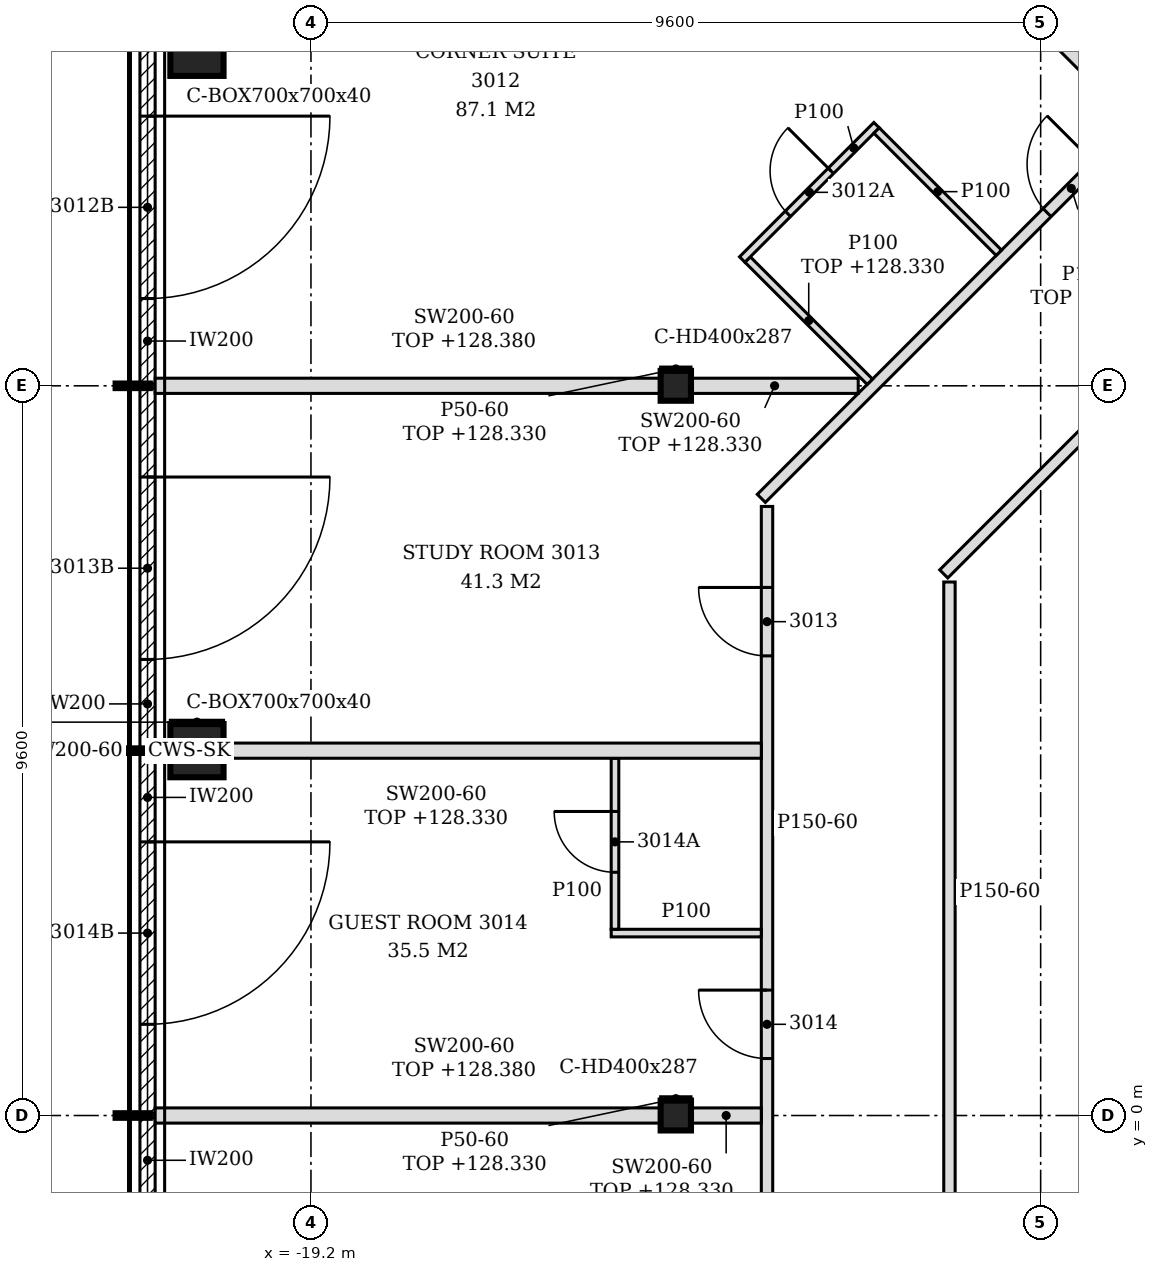
"""IFC4 building model, lengths in metres.
Left out: names, types, materials, properties, quantities, classifications, styles, units other than length and angle.
Written with IfcOpenShell. Run it as: python <this file> out.ifc"""

import sys

from ifc_helpers import new_model, si_unit, direction, frame, frame_2d, origin, origin_2d, place, context, subcontext, project, spatial, polyline, rectangle, hollow_rectangle, i_section, outline, extrude, element, fill, save


model = new_model("IFC4")
c1 = context("Model", 3, precision=1e-05, world=origin(), true_north=direction((0.0, 1.0)))
c2 = subcontext(c1, "Body", "Model", "MODEL_VIEW")
j1 = project(units=[si_unit("LENGTHUNIT", "METRE"), si_unit("PLANEANGLEUNIT", "RADIAN")], contexts=[c1])
p1 = place(None, origin())
s1 = spatial("IfcSite", under=j1, at=p1, CompositionType="ELEMENT")
p2 = place(p1, origin())
s2 = spatial("IfcBuilding", under=s1, at=p2, CompositionType="ELEMENT")
p3 = place(p2, frame((0.0, 0.0, 125.4)))
s3 = spatial("IfcBuildingStorey", under=s2, at=p3, CompositionType="ELEMENT", Elevation=125.4)
for number, where, z_axis, x_axis in (
    (1, (-20.7, 14.027, -0.15), (0.0, 0.0, 1.0), (1.0, 0.0, 0.0)),
    (2, (-20.7, 4.8, -0.15), (0.0, 0.0, 1.0), (1.0, 0.0, 0.0)),
):
    element("IfcColumn", number, at=place(p3, frame(where, z_axis=z_axis, x_axis=x_axis)), inside=s3, PredefinedType="COLUMN", context=c2, shape_type="SweptSolid", body=[
        extrude(hollow_rectangle(XDim=0.7, YDim=0.7, WallThickness=0.04, at=origin_2d()), origin(), (0.0, 0.0, 1.0), 3.6),
    ])
for number, where, z_axis, x_axis in (
    (3, (-14.4, 0.0, -0.15), (0.0, 0.0, 1.0), (1.0, 0.0, 0.0)),
    (4, (-14.4, 9.6, -0.15), (0.0, 0.0, 1.0), (1.0, 0.0, 0.0)),
):
    element("IfcColumn", number, at=place(p3, frame(where, z_axis=z_axis, x_axis=x_axis)), inside=s3, PredefinedType="COLUMN", context=c2, shape_type="SweptSolid", body=[
        extrude(i_section(OverallWidth=0.399, OverallDepth=0.393, WebThickness=0.023, FlangeThickness=0.037, FilletRadius=0.015, at=origin_2d()), origin(), (0.0, 0.0, 1.0), 3.6),
    ])
p4 = place(p3, frame((-21.35, 14.256, 0.0), z_axis=(0.0, 0.0, 1.0), x_axis=(0.0, -1.0, 0.0)))
e5 = element("IfcWall", 5, at=p4, inside=s3, PredefinedType="NOTDEFINED", context=c2, shape_type="SweptSolid", body=[
    extrude(rectangle(XDim=4.626, YDim=0.2, at=frame_2d((2.313, 0.0))), origin(), (0.0, 0.0, 1.0), 3.45),
])
p5 = place(p4, frame((1.108, 0.0, 0.0)))
e6 = element("IfcOpeningElement", 6, at=p5, cuts=e5, PredefinedType="OPENING", context=c2, shape_type="SweptSolid", body=[
    extrude(rectangle(XDim=2.4, YDim=2.4, at=frame_2d((1.2, 1.2))), frame((0.0, 0.11, 0.0), z_axis=(0.0, -1.0, 0.0), x_axis=(1.0, 0.0, 0.0)), (0.0, 0.0, 1.0), 0.22),
])
p6 = place(p3, frame((-21.35, 9.57, 0.0), z_axis=(0.0, 0.0, 1.0), x_axis=(0.0, -1.0, 0.0)))
e7 = element("IfcWall", 7, at=p6, inside=s3, PredefinedType="NOTDEFINED", context=c2, shape_type="SweptSolid", body=[
    extrude(rectangle(XDim=4.74, YDim=0.2, at=frame_2d((2.37, 0.0))), origin(), (0.0, 0.0, 1.0), 3.45),
])
p7 = place(p6, frame((1.17, 0.0, 0.0)))
e8 = element("IfcOpeningElement", 8, at=p7, cuts=e7, PredefinedType="OPENING", context=c2, shape_type="SweptSolid", body=[
    extrude(rectangle(XDim=2.4, YDim=2.4, at=frame_2d((1.2, 1.2))), frame((0.0, 0.11, 0.0), z_axis=(0.0, -1.0, 0.0), x_axis=(1.0, 0.0, 0.0)), (0.0, 0.0, 1.0), 0.22),
])
p8 = place(p3, frame((-21.35, 4.77, 0.0), z_axis=(0.0, 0.0, 1.0), x_axis=(0.0, -1.0, 0.0)))
e9 = element("IfcWall", 9, at=p8, inside=s3, PredefinedType="NOTDEFINED", context=c2, shape_type="SweptSolid", body=[
    extrude(rectangle(XDim=4.74, YDim=0.2, at=frame_2d((2.37, 0.0))), origin(), (0.0, 0.0, 1.0), 3.45),
])
p9 = place(p8, frame((1.17, 0.0, 0.0)))
e10 = element("IfcOpeningElement", 10, at=p9, cuts=e9, PredefinedType="OPENING", context=c2, shape_type="SweptSolid", body=[
    extrude(rectangle(XDim=2.4, YDim=2.4, at=frame_2d((1.2, 1.2))), frame((0.0, 0.11, 0.0), z_axis=(0.0, -1.0, 0.0), x_axis=(1.0, 0.0, 0.0)), (0.0, 0.0, 1.0), 0.22),
])
p10 = place(p3, frame((-21.35, -0.03, 0.0), z_axis=(0.0, 0.0, 1.0), x_axis=(0.0, -1.0, 0.0)))
e11 = element("IfcWall", 11, at=p10, inside=s3, PredefinedType="NOTDEFINED", context=c2, shape_type="SweptSolid", body=[
    extrude(rectangle(XDim=4.626, YDim=0.2, at=frame_2d((2.313, 0.0))), origin(), (0.0, 0.0, 1.0), 3.45),
])
p11 = place(p10, frame((1.118, 0.0, 0.0)))
e12 = element("IfcOpeningElement", 12, at=p11, cuts=e11, PredefinedType="OPENING", context=c2, shape_type="SweptSolid", body=[
    extrude(rectangle(XDim=2.4, YDim=2.4, at=frame_2d((1.2, 1.2))), frame((0.0, 0.11, 0.0), z_axis=(0.0, -1.0, 0.0), x_axis=(1.0, 0.0, 0.0)), (0.0, 0.0, 1.0), 0.22),
])
p12 = place(p3, frame((-13.2, -3.5, 0.0), z_axis=(0.0, 0.0, 1.0), x_axis=(0.0, 1.0, 0.0)))
e13 = element("IfcWall", 13, at=p12, inside=s3, PredefinedType="PARTITIONING", context=c2, shape_type="SweptSolid", body=[
    extrude(outline(polyline([(0.0, 0.0), (11.513, 0.0), (11.513, 3.45), (8.4, 3.45), (8.398, 2.93), (8.2, 2.93), (8.198, 3.45), (3.6, 3.45), (3.598, 2.93), (3.4, 2.93), (3.398, 3.45), (0.0, 3.45), (0.0, 0.0)])), frame((0.0, 0.075, 0.0), z_axis=(0.0, -1.0, 0.0), x_axis=(1.0, 0.0, 0.0)), (0.0, 0.0, 1.0), 0.15),
])
p13 = place(p12, frame((9.547, 0.0, 0.0)))
e14 = element("IfcOpeningElement", 14, at=p13, cuts=e13, PredefinedType="OPENING", context=c2, shape_type="SweptSolid", body=[
    extrude(rectangle(XDim=0.9, YDim=2.1, at=frame_2d((0.45, 1.05))), frame((0.0, 0.085, 0.0), z_axis=(0.0, -1.0, 0.0), x_axis=(1.0, 0.0, 0.0)), (0.0, 0.0, 1.0), 0.17),
])
p14 = place(p12, frame((4.25, 0.0, 0.0)))
e15 = element("IfcOpeningElement", 15, at=p14, cuts=e13, PredefinedType="OPENING", context=c2, shape_type="SweptSolid", body=[
    extrude(rectangle(XDim=0.9, YDim=2.1, at=frame_2d((0.45, 1.05))), frame((0.0, 0.085, 0.0), z_axis=(0.0, -1.0, 0.0), x_axis=(1.0, 0.0, 0.0)), (0.0, 0.0, 1.0), 0.17),
])
p15 = place(p12, frame((1.353, 0.0, 0.0)))
e16 = element("IfcOpeningElement", 16, at=p15, cuts=e13, PredefinedType="OPENING", context=c2, shape_type="SweptSolid", body=[
    extrude(rectangle(XDim=0.9, YDim=2.1, at=frame_2d((0.45, 1.05))), frame((0.0, 0.085, 0.0), z_axis=(0.0, -1.0, 0.0), x_axis=(1.0, 0.0, 0.0)), (0.0, 0.0, 1.0), 0.17),
])
p16 = place(p3, frame((-10.8, -1.125, 0.0), z_axis=(0.0, 0.0, 1.0), x_axis=(0.0, 1.0, 0.0)))
e17 = element("IfcWall", 17, at=p16, inside=s3, PredefinedType="PARTITIONING", context=c2, shape_type="SweptSolid", body=[
    extrude(outline(polyline([(0.0, 0.0), (8.144, 0.0), (8.144, 3.45), (6.025, 3.45), (6.023, 2.93), (5.825, 2.93), (5.823, 3.45), (1.225, 3.45), (1.223, 2.93), (1.025, 2.93), (1.023, 3.45), (0.0, 3.45), (0.0, 0.0)])), frame((0.0, 0.075, 0.0), z_axis=(0.0, -1.0, 0.0), x_axis=(1.0, 0.0, 0.0)), (0.0, 0.0, 1.0), 0.15),
])
p17 = place(p3, frame((-21.25, 0.0, 0.0), z_axis=(0.0, 0.0, 1.0), x_axis=(1.0, 0.0, 0.0)))
e18 = element("IfcWall", 18, at=p17, inside=s3, PredefinedType="PARTITIONING", context=c2, shape_type="SweptSolid", body=[
    extrude(outline(polyline([(0.0, 0.0), (6.65, 0.0), (6.65, 2.98), (0.7, 2.98), (0.698, 2.93), (0.4, 2.93), (0.398, 2.98), (0.0, 2.98), (0.0, 0.0)])), frame((0.0, 0.1, 0.0), z_axis=(0.0, -1.0, 0.0), x_axis=(1.0, 0.0, 0.0)), (0.0, 0.0, 1.0), 0.2),
])
p18 = place(p3, frame((-14.2, 0.0, 0.0), z_axis=(0.0, 0.0, 1.0), x_axis=(1.0, 0.0, 0.0)))
e19 = element("IfcWall", 19, at=p18, inside=s3, PredefinedType="PARTITIONING", context=c2, shape_type="SweptSolid", body=[
    extrude(rectangle(XDim=0.926, YDim=0.2, at=frame_2d((0.463, 0.0))), origin(), (0.0, 0.0, 1.0), 2.93),
])
p19 = place(p3, frame((-15.25, 2.4, 0.0), z_axis=(0.0, 0.0, 1.0), x_axis=(1.0, 0.0, 0.0)))
e20 = element("IfcWall", 20, at=p19, inside=s3, PredefinedType="PARTITIONING", context=c2, shape_type="SweptSolid", body=[
    extrude(outline(polyline([(0.0, 0.0), (1.975, 0.0), (1.975, 3.45), (1.0, 3.45), (0.998, 2.93), (0.7, 2.93), (0.698, 3.45), (0.0, 3.45), (0.0, 0.0)])), frame((0.0, 0.05, 0.0), z_axis=(0.0, -1.0, 0.0), x_axis=(1.0, 0.0, 0.0)), (0.0, 0.0, 1.0), 0.1),
])
p20 = place(p3, frame((-15.2, 2.45, 0.0), z_axis=(0.0, 0.0, 1.0), x_axis=(0.0, 1.0, 0.0)))
e21 = element("IfcWall", 21, at=p20, inside=s3, PredefinedType="PARTITIONING", context=c2, shape_type="SweptSolid", body=[
    extrude(rectangle(XDim=2.25, YDim=0.1, at=frame_2d((1.125, 0.0))), origin(), (0.0, 0.0, 1.0), 3.45),
])
p21 = place(p20, frame((0.75, 0.0, 0.0)))
e22 = element("IfcOpeningElement", 22, at=p21, cuts=e21, PredefinedType="OPENING", context=c2, shape_type="SweptSolid", body=[
    extrude(rectangle(XDim=0.8, YDim=2.1, at=frame_2d((0.4, 1.05))), frame((0.0, 0.06, 0.0), z_axis=(0.0, -1.0, 0.0), x_axis=(1.0, 0.0, 0.0)), (0.0, 0.0, 1.0), 0.12),
])
p22 = place(p3, frame((-21.25, 4.8, 0.0), z_axis=(0.0, 0.0, 1.0), x_axis=(1.0, 0.0, 0.0)))
e23 = element("IfcWall", 23, at=p22, inside=s3, PredefinedType="PARTITIONING", context=c2, shape_type="SweptSolid", body=[
    extrude(rectangle(XDim=0.2, YDim=0.2, at=frame_2d((0.1, 0.0))), origin(), (0.0, 0.0, 1.0), 3.45),
])
p23 = place(p3, frame((-20.35, 4.8, 0.0), z_axis=(0.0, 0.0, 1.0), x_axis=(1.0, 0.0, 0.0)))
e24 = element("IfcWall", 24, at=p23, inside=s3, PredefinedType="PARTITIONING", context=c2, shape_type="SweptSolid", body=[
    extrude(rectangle(XDim=7.075, YDim=0.2, at=frame_2d((3.538, 0.0))), origin(), (0.0, 0.0, 1.0), 2.93),
])
p24 = place(p3, frame((-10.875, 7.125, 0.0), z_axis=(0.0, 0.0, 1.0), x_axis=(0.707106781187, 0.707106781187, 0.0)))
e25 = element("IfcWall", 25, at=p24, inside=s3, PredefinedType="PARTITIONING", context=c2, shape_type="SweptSolid", body=[
    extrude(rectangle(XDim=8.296, YDim=0.15, at=frame_2d((4.148, 0.0))), origin(), (0.0, 0.0, 1.0), 2.93),
])
p25 = place(p3, frame((-13.275, 8.119, 0.0), z_axis=(0.0, 0.0, 1.0), x_axis=(0.707099678619, 0.707113883683, 0.0)))
e26 = element("IfcWall", 26, at=p25, inside=s3, PredefinedType="PARTITIONING", context=c2, shape_type="SweptSolid", body=[
    extrude(rectangle(XDim=17.187, YDim=0.15, at=frame_2d((8.593, 0.0))), origin(), (0.0, 0.0, 1.0), 2.73),
])
p26 = place(p25, frame((9.073, 0.0, 0.0)))
e27 = element("IfcOpeningElement", 27, at=p26, cuts=e26, PredefinedType="OPENING", context=c2, shape_type="SweptSolid", body=[
    extrude(rectangle(XDim=0.9, YDim=2.1, at=frame_2d((0.45, 1.05))), frame((0.0, 0.085, 0.0), z_axis=(0.0, -1.0, 0.0), x_axis=(1.0, 0.0, 0.0)), (0.0, 0.0, 1.0), 0.17),
])
p27 = place(p25, frame((5.317, 0.0, 0.0)))
e28 = element("IfcOpeningElement", 28, at=p27, cuts=e26, PredefinedType="OPENING", context=c2, shape_type="SweptSolid", body=[
    extrude(rectangle(XDim=0.9, YDim=2.1, at=frame_2d((0.45, 1.05))), frame((0.0, 0.085, 0.0), z_axis=(0.0, -1.0, 0.0), x_axis=(1.0, 0.0, 0.0)), (0.0, 0.0, 1.0), 0.17),
])
p28 = place(p3, frame((-21.25, 9.6, 0.0), z_axis=(0.0, 0.0, 1.0), x_axis=(1.0, 0.0, 0.0)))
e29 = element("IfcWall", 29, at=p28, inside=s3, PredefinedType="PARTITIONING", context=c2, shape_type="SweptSolid", body=[
    extrude(outline(polyline([(0.0, 0.0), (6.65, 0.0), (6.65, 2.98), (0.7, 2.98), (0.698, 2.93), (0.4, 2.93), (0.398, 2.98), (0.0, 2.98), (0.0, 0.0)])), frame((0.0, 0.1, 0.0), z_axis=(0.0, -1.0, 0.0), x_axis=(1.0, 0.0, 0.0)), (0.0, 0.0, 1.0), 0.2),
])
p29 = place(p3, frame((-14.2, 9.6, 0.0), z_axis=(0.0, 0.0, 1.0), x_axis=(1.0, 0.0, 0.0)))
e30 = element("IfcWall", 30, at=p29, inside=s3, PredefinedType="PARTITIONING", context=c2, shape_type="SweptSolid", body=[
    extrude(rectangle(XDim=2.2, YDim=0.2, at=frame_2d((1.1, 0.0))), origin(), (0.0, 0.0, 1.0), 2.93),
])
p30 = place(p3, frame((-11.847, 9.653, 0.0), z_axis=(0.0, 0.0, 1.0), x_axis=(-0.707106781187, 0.707106781187, 0.0)))
e31 = element("IfcWall", 31, at=p30, inside=s3, PredefinedType="PARTITIONING", context=c2, shape_type="SweptSolid", body=[
    extrude(rectangle(XDim=2.275, YDim=0.1, at=frame_2d((1.137, 0.0))), origin(), (0.0, 0.0, 1.0), 2.93),
])
p31 = place(p3, frame((-13.526, 11.262, 0.0), z_axis=(0.0, 0.0, 1.0), x_axis=(0.707106781187, 0.707106781187, 0.0)))
e32 = element("IfcWall", 32, at=p31, inside=s3, PredefinedType="PARTITIONING", context=c2, shape_type="SweptSolid", body=[
    extrude(rectangle(XDim=2.5, YDim=0.1, at=frame_2d((1.25, 0.0))), origin(), (0.0, 0.0, 1.0), 3.45),
])
p32 = place(p31, frame((0.85, 0.0, 0.0)))
e33 = element("IfcOpeningElement", 33, at=p32, cuts=e32, PredefinedType="OPENING", context=c2, shape_type="SweptSolid", body=[
    extrude(rectangle(XDim=0.8, YDim=2.1, at=frame_2d((0.4, 1.05))), frame((0.0, 0.06, 0.0), z_axis=(0.0, -1.0, 0.0), x_axis=(1.0, 0.0, 0.0)), (0.0, 0.0, 1.0), 0.12),
])
p33 = place(p3, frame((-10.15, 11.35, 0.0), z_axis=(0.0, 0.0, 1.0), x_axis=(-0.707160441348, 0.707053116953, 0.0)))
e34 = element("IfcWall", 34, at=p33, inside=s3, PredefinedType="PARTITIONING", context=c2, shape_type="SweptSolid", body=[
    extrude(rectangle(XDim=2.275, YDim=0.1, at=frame_2d((1.137, 0.0))), origin(), (0.0, 0.0, 1.0), 3.45),
])
p34 = place(p3, frame((-8.35, 13.15, 0.0), z_axis=(0.0, 0.0, 1.0), x_axis=(-0.707092030896, 0.707121531169, 0.0)))
e35 = element("IfcWall", 35, at=p34, inside=s3, PredefinedType="PARTITIONING", context=c2, shape_type="SweptSolid", body=[
    extrude(rectangle(XDim=8.276, YDim=0.2, at=frame_2d((4.138, 0.0))), origin(), (0.0, 0.0, 1.0), 2.93),
])
p35 = place(p3, frame((-14.6, 0.221, 0.0), z_axis=(0.0, 0.0, 1.0), x_axis=(1.0, 0.0, 0.0)))
e36 = element("IfcWall", 36, at=p35, inside=s3, PredefinedType="PARTITIONING", context=c2, shape_type="SweptSolid", body=[
    extrude(rectangle(XDim=0.399, YDim=0.05, at=frame_2d((0.2, 0.0))), origin(), (0.0, 0.0, 1.0), 2.93),
])
p36 = place(p3, frame((-21.05, 5.175, 0.0), z_axis=(0.0, 0.0, 1.0), x_axis=(1.0, 0.0, 0.0)))
e37 = element("IfcWall", 37, at=p36, inside=s3, PredefinedType="PARTITIONING", context=c2, shape_type="SweptSolid", body=[
    extrude(rectangle(XDim=0.7, YDim=0.05, at=frame_2d((0.35, 0.0))), origin(), (0.0, 0.0, 1.0), 2.93),
])
p37 = place(p3, frame((-14.6, 9.822, 0.0), z_axis=(0.0, 0.0, 1.0), x_axis=(1.0, 0.0, 0.0)))
e38 = element("IfcWall", 38, at=p37, inside=s3, PredefinedType="PARTITIONING", context=c2, shape_type="SweptSolid", body=[
    extrude(rectangle(XDim=0.399, YDim=0.05, at=frame_2d((0.2, 0.0))), origin(), (0.0, 0.0, 1.0), 2.93),
])
p38 = place(p5, origin())
e39 = element("IfcDoor", 39, at=p38, inside=s3, OperationType="SINGLE_SWING_LEFT", PredefinedType="DOOR", context=c2, shape_type="SweptSolid", body=[
    extrude(rectangle(XDim=2.4, YDim=2.4, at=frame_2d((1.2, 1.2))), frame((0.0, 0.025, 0.0), z_axis=(0.0, -1.0, 0.0), x_axis=(1.0, 0.0, 0.0)), (0.0, 0.0, 1.0), 0.05),
])
fill(e6, e39)
p39 = place(p7, origin())
e40 = element("IfcDoor", 40, at=p39, inside=s3, OperationType="SINGLE_SWING_LEFT", PredefinedType="DOOR", context=c2, shape_type="SweptSolid", body=[
    extrude(rectangle(XDim=2.4, YDim=2.4, at=frame_2d((1.2, 1.2))), frame((0.0, 0.025, 0.0), z_axis=(0.0, -1.0, 0.0), x_axis=(1.0, 0.0, 0.0)), (0.0, 0.0, 1.0), 0.05),
])
fill(e8, e40)
p40 = place(p9, origin())
e41 = element("IfcDoor", 41, at=p40, inside=s3, OperationType="SINGLE_SWING_LEFT", PredefinedType="DOOR", context=c2, shape_type="SweptSolid", body=[
    extrude(rectangle(XDim=2.4, YDim=2.4, at=frame_2d((1.2, 1.2))), frame((0.0, 0.025, 0.0), z_axis=(0.0, -1.0, 0.0), x_axis=(1.0, 0.0, 0.0)), (0.0, 0.0, 1.0), 0.05),
])
fill(e10, e41)
p41 = place(p27, origin())
e42 = element("IfcDoor", 42, at=p41, inside=s3, OperationType="SINGLE_SWING_RIGHT", PredefinedType="DOOR", context=c2, shape_type="SweptSolid", body=[
    extrude(rectangle(XDim=0.9, YDim=2.1, at=frame_2d((0.45, 1.05))), frame((0.0, 0.025, 0.0), z_axis=(0.0, -1.0, 0.0), x_axis=(1.0, 0.0, 0.0)), (0.0, 0.0, 1.0), 0.05),
])
fill(e28, e42)
p42 = place(p32, origin())
e43 = element("IfcDoor", 43, at=p42, inside=s3, OperationType="SINGLE_SWING_RIGHT", PredefinedType="DOOR", context=c2, shape_type="SweptSolid", body=[
    extrude(rectangle(XDim=0.8, YDim=2.1, at=frame_2d((0.4, 1.05))), frame((0.0, 0.025, 0.0), z_axis=(0.0, -1.0, 0.0), x_axis=(1.0, 0.0, 0.0)), (0.0, 0.0, 1.0), 0.05),
])
fill(e33, e43)
p43 = place(p13, origin())
e44 = element("IfcDoor", 44, at=p43, inside=s3, OperationType="SINGLE_SWING_RIGHT", PredefinedType="DOOR", context=c2, shape_type="SweptSolid", body=[
    extrude(rectangle(XDim=0.9, YDim=2.1, at=frame_2d((0.45, 1.05))), frame((0.0, 0.025, 0.0), z_axis=(0.0, -1.0, 0.0), x_axis=(1.0, 0.0, 0.0)), (0.0, 0.0, 1.0), 0.05),
])
fill(e14, e44)
p44 = place(p14, origin())
e45 = element("IfcDoor", 45, at=p44, inside=s3, OperationType="SINGLE_SWING_RIGHT", PredefinedType="DOOR", context=c2, shape_type="SweptSolid", body=[
    extrude(rectangle(XDim=0.9, YDim=2.1, at=frame_2d((0.45, 1.05))), frame((0.0, 0.025, 0.0), z_axis=(0.0, -1.0, 0.0), x_axis=(1.0, 0.0, 0.0)), (0.0, 0.0, 1.0), 0.05),
])
fill(e15, e45)
p45 = place(p21, origin())
e46 = element("IfcDoor", 46, at=p45, inside=s3, OperationType="SINGLE_SWING_RIGHT", PredefinedType="DOOR", context=c2, shape_type="SweptSolid", body=[
    extrude(rectangle(XDim=0.8, YDim=2.1, at=frame_2d((0.4, 1.05))), frame((0.0, 0.025, 0.0), z_axis=(0.0, -1.0, 0.0), x_axis=(1.0, 0.0, 0.0)), (0.0, 0.0, 1.0), 0.05),
])
fill(e22, e46)
save(model, sys.argv[1])
